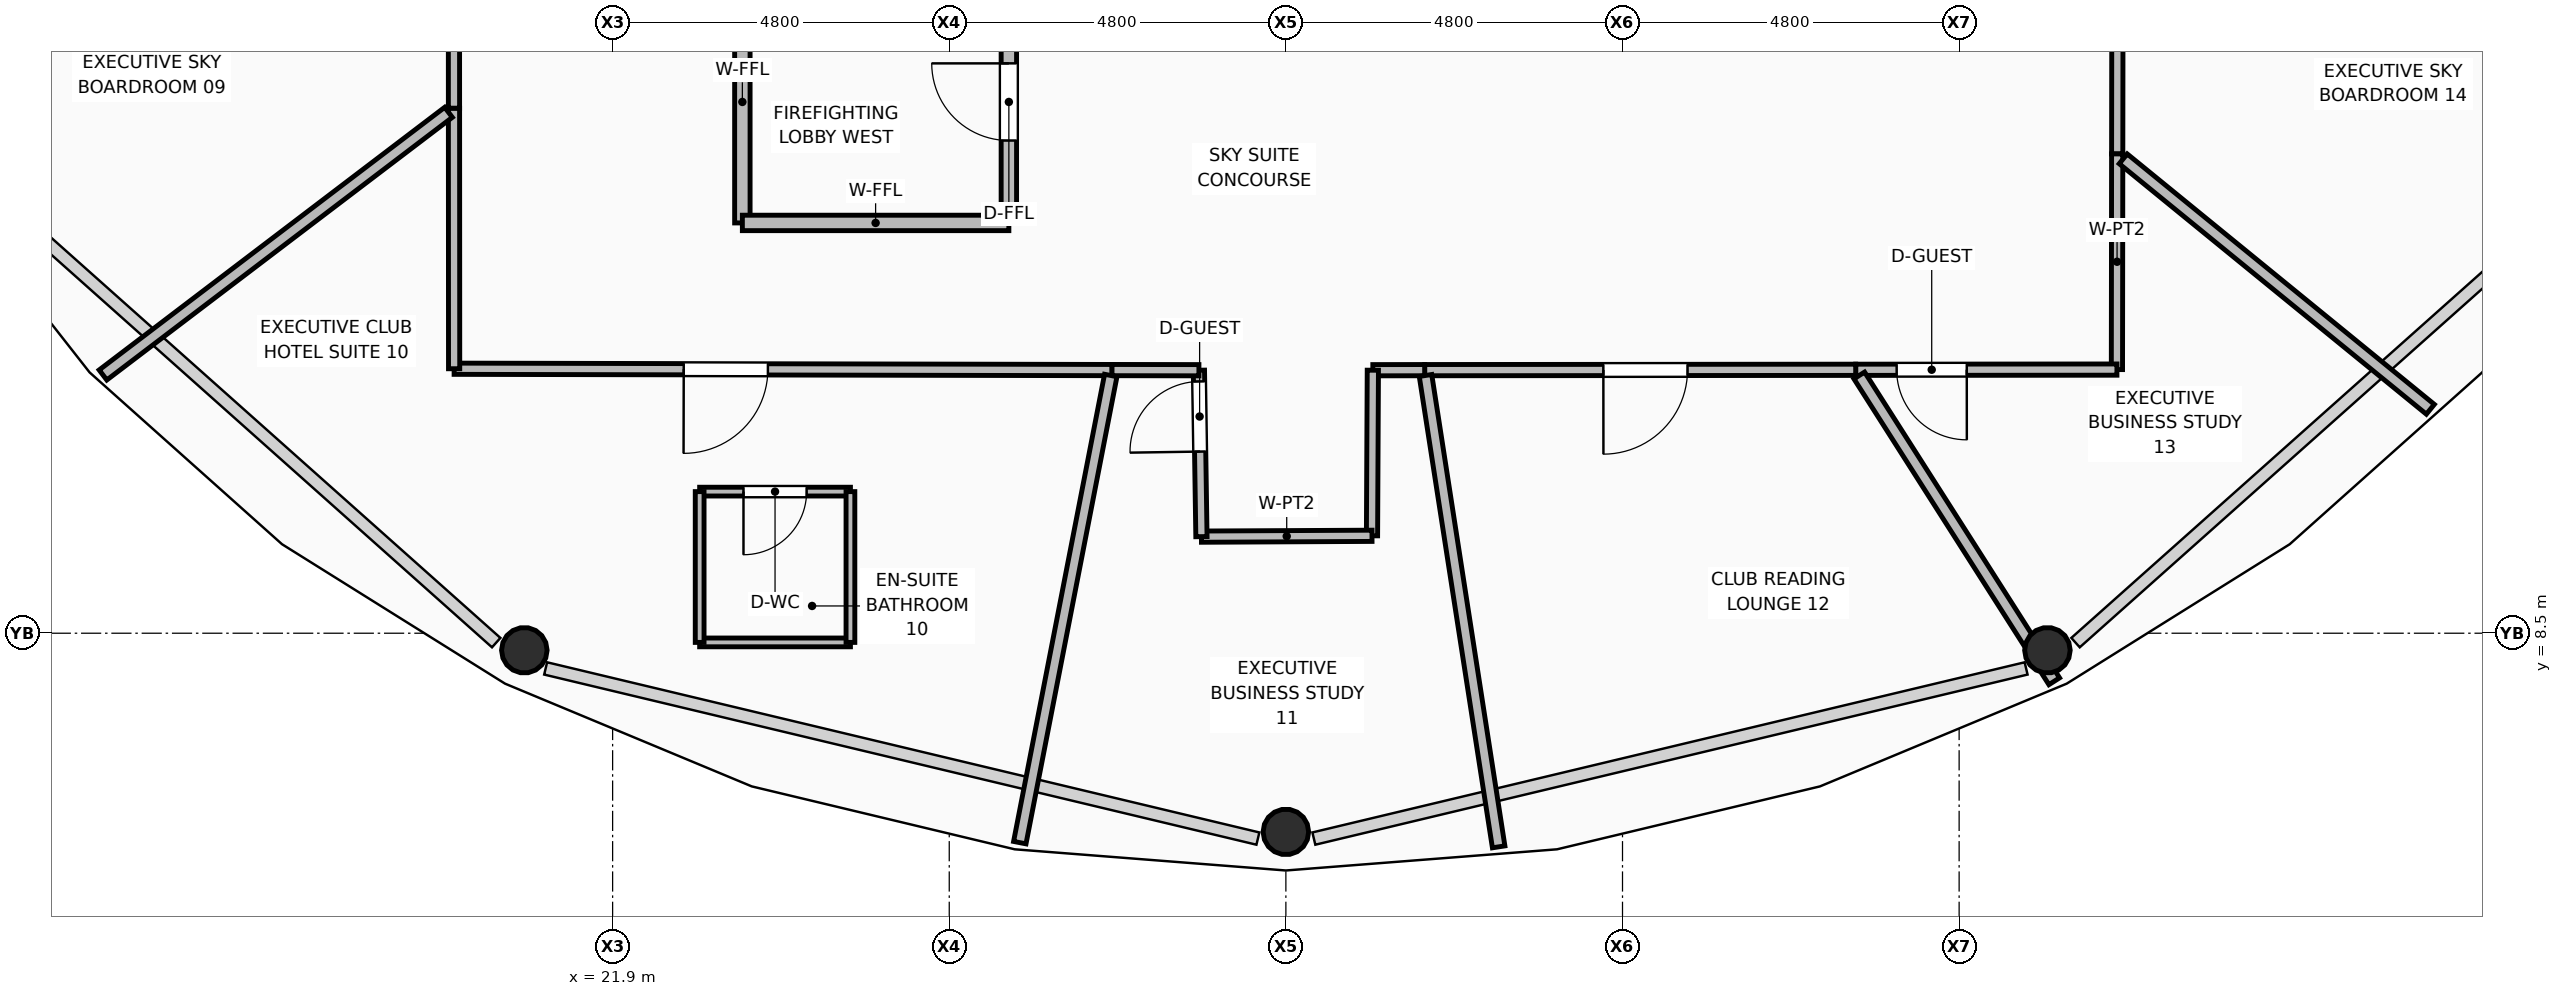
"""IFC4 building model, lengths in metres.
Left out: names, types, materials, properties, quantities, classifications, styles, units other than length and angle.
Written with IfcOpenShell. Run it as: python <this file> out.ifc"""

import sys

from ifc_helpers import new_model, si_unit, direction, frame, frame_2d, origin, origin_2d, place, context, subcontext, project, spatial, rectangle, hollow_circle, extrude, element, fill, save


model = new_model("IFC4")
c1 = context("Model", 3, precision=1e-05, world=origin(), true_north=direction((0.0, 1.0)))
c2 = subcontext(c1, "Body", "Model", "MODEL_VIEW")
j1 = project(units=[si_unit("LENGTHUNIT", "METRE"), si_unit("PLANEANGLEUNIT", "RADIAN")], contexts=[c1])
p1 = place(None, origin())
s1 = spatial("IfcSite", under=j1, at=p1, CompositionType="ELEMENT")
p2 = place(p1, origin())
s2 = spatial("IfcBuilding", under=s1, at=p2, CompositionType="ELEMENT")
p3 = place(p2, frame((0.0, 0.0, 249.9)))
s3 = spatial("IfcBuildingStorey", under=s2, at=p3, CompositionType="ELEMENT", Elevation=249.9)
p4 = place(p3, frame((20.641, 8.257, 0.0), z_axis=(0.052280348299, 0.081024125451, 0.995340070668), x_axis=(-0.840264904476, 0.542176069469, 0.0)))
e1 = element("IfcColumn", 1, at=p4, inside=s3, PredefinedType="COLUMN", context=c2, shape_type="SweptSolid", body=[
    extrude(hollow_circle(Radius=0.325, WallThickness=0.03, at=origin_2d()), origin(), (0.0, 0.0, 1.0), 3.516),
])
p5 = place(p3, frame((31.5, 5.667, 0.0), z_axis=(0.0, 0.093616077373, 0.99560837183), x_axis=(-1.0, 0.0, 0.0)))
e2 = element("IfcColumn", 2, at=p5, inside=s3, PredefinedType="COLUMN", context=c2, shape_type="SweptSolid", body=[
    extrude(hollow_circle(Radius=0.325, WallThickness=0.03, at=origin_2d()), origin(), (0.0, 0.0, 1.0), 3.515),
])
p6 = place(p3, frame((42.359, 8.257, 0.0), z_axis=(-0.052280348299, 0.081024125451, 0.995340070668), x_axis=(-0.840264904476, -0.542176069469, 0.0)))
e3 = element("IfcColumn", 3, at=p6, inside=s3, PredefinedType="COLUMN", context=c2, shape_type="SweptSolid", body=[
    extrude(hollow_circle(Radius=0.325, WallThickness=0.03, at=origin_2d()), origin(), (0.0, 0.0, 1.0), 3.516),
])
p7 = place(p3, frame((23.75, 14.35, 0.0), z_axis=(0.0, 0.0, 1.0), x_axis=(0.0, 1.0, 0.0)))
e4 = element("IfcWall", 4, at=p7, inside=s3, PredefinedType="PARTITIONING", context=c2, shape_type="SweptSolid", body=[
    extrude(rectangle(XDim=3.45, YDim=0.22, at=frame_2d((1.725, 0.0))), origin(), (0.0, 0.0, 1.0), 3.012),
])
p8 = place(p3, frame((23.75, 14.35, 0.0), z_axis=(0.0, 0.0, 1.0), x_axis=(1.0, 0.0, 0.0)))
e5 = element("IfcWall", 5, at=p8, inside=s3, PredefinedType="PARTITIONING", context=c2, shape_type="SweptSolid", body=[
    extrude(rectangle(XDim=3.8, YDim=0.22, at=frame_2d((1.9, 0.0))), origin(), (0.0, 0.0, 1.0), 3.48),
])
p9 = place(p3, frame((27.55, 14.35, 0.0), z_axis=(0.0, 0.0, 1.0), x_axis=(0.0, 1.0, 0.0)))
e6 = element("IfcWall", 6, at=p9, inside=s3, PredefinedType="PARTITIONING", context=c2, shape_type="SweptSolid", body=[
    extrude(rectangle(XDim=3.45, YDim=0.22, at=frame_2d((1.725, 0.0))), origin(), (0.0, 0.0, 1.0), 3.012),
])
p10 = place(p9, frame((1.175, 0.0, 0.0)))
e7 = element("IfcOpeningElement", 7, at=p10, cuts=e6, PredefinedType="OPENING", context=c2, shape_type="SweptSolid", body=[
    extrude(rectangle(XDim=1.1, YDim=2.1, at=frame_2d((0.55, 1.05))), frame((0.0, 0.12, 0.0), z_axis=(0.0, -1.0, 0.0), x_axis=(1.0, 0.0, 0.0)), (0.0, 0.0, 1.0), 0.24),
])
p11 = place(p3, frame((43.362, 21.09, 0.0), z_axis=(0.0, 0.0, 1.0), x_axis=(-0.001399667798, -0.999999020465, 0.0)))
e8 = element("IfcWall", 8, at=p11, inside=s3, PredefinedType="PARTITIONING", context=c2, shape_type="SweptSolid", body=[
    extrude(rectangle(XDim=5.756, YDim=0.16, at=frame_2d((2.878, 0.0))), origin(), (0.0, 0.0, 1.0), 3.012),
])
p12 = place(p11, frame((0.598, 0.0, 0.0)))
e9 = element("IfcOpeningElement", 9, at=p12, cuts=e8, PredefinedType="OPENING", context=c2, shape_type="SweptSolid", body=[
    extrude(rectangle(XDim=1.2, YDim=2.1, at=frame_2d((0.6, 1.05))), frame((0.0, 0.09, 0.0), z_axis=(0.0, -1.0, 0.0), x_axis=(1.0, 0.0, 0.0)), (0.0, 0.0, 1.0), 0.18),
])
p13 = place(p3, frame((43.354, 15.334, 0.0), z_axis=(0.0, 0.0, 1.0), x_axis=(-0.00127034435, -0.999999193112, 0.0)))
e10 = element("IfcWall", 10, at=p13, inside=s3, PredefinedType="PARTITIONING", context=c2, shape_type="SweptSolid", body=[
    extrude(rectangle(XDim=3.075, YDim=0.16, at=frame_2d((1.538, 0.0))), origin(), (0.0, 0.0, 1.0), 3.48),
])
p14 = place(p3, frame((43.35, 12.259, 0.0), z_axis=(0.0, 0.0, 1.0), x_axis=(-0.999999690731, -0.000786472427, 0.0)))
e11 = element("IfcWall", 11, at=p14, inside=s3, PredefinedType="PARTITIONING", context=c2, shape_type="SweptSolid", body=[
    extrude(rectangle(XDim=3.725, YDim=0.16, at=frame_2d((1.863, 0.0))), origin(), (0.0, 0.0, 1.0), 3.012),
])
p15 = place(p14, frame((2.141, 0.0, 0.0)))
e12 = element("IfcOpeningElement", 12, at=p15, cuts=e11, PredefinedType="OPENING", context=c2, shape_type="SweptSolid", body=[
    extrude(rectangle(XDim=1.0, YDim=2.1, at=frame_2d((0.5, 1.05))), frame((0.0, 0.09, 0.0), z_axis=(0.0, -1.0, 0.0), x_axis=(1.0, 0.0, 0.0)), (0.0, 0.0, 1.0), 0.18),
])
p16 = place(p3, frame((39.625, 12.256, 0.0), z_axis=(0.0, 0.0, 1.0), x_axis=(-0.99999965206, -0.000834193719, 0.0)))
e13 = element("IfcWall", 13, at=p16, inside=s3, PredefinedType="PARTITIONING", context=c2, shape_type="SweptSolid", body=[
    extrude(rectangle(XDim=6.146, YDim=0.16, at=frame_2d((3.073, 0.0))), origin(), (0.0, 0.0, 1.0), 3.48),
])
p17 = place(p16, frame((2.398, 0.0, 0.0)))
e14 = element("IfcOpeningElement", 14, at=p17, cuts=e13, PredefinedType="OPENING", context=c2, shape_type="SweptSolid", body=[
    extrude(rectangle(XDim=1.2, YDim=2.1, at=frame_2d((0.6, 1.05))), frame((0.0, 0.09, 0.0), z_axis=(0.0, -1.0, 0.0), x_axis=(1.0, 0.0, 0.0)), (0.0, 0.0, 1.0), 0.18),
])
p18 = place(p3, frame((33.479, 12.251, 0.0), z_axis=(0.0, 0.0, 1.0), x_axis=(-0.999999126899, -0.001321439216, 0.0)))
e15 = element("IfcWall", 15, at=p18, inside=s3, PredefinedType="PARTITIONING", context=c2, shape_type="SweptSolid", body=[
    extrude(rectangle(XDim=0.739, YDim=0.16, at=frame_2d((0.37, 0.0))), origin(), (0.0, 0.0, 1.0), 3.48),
])
p19 = place(p3, frame((32.74, 12.25, 0.0), z_axis=(0.0, 0.0, 1.0), x_axis=(-0.005066629207, -0.999987164552, 0.0)))
e16 = element("IfcWall", 16, at=p19, inside=s3, PredefinedType="PARTITIONING", context=c2, shape_type="SweptSolid", body=[
    extrude(rectangle(XDim=2.361, YDim=0.16, at=frame_2d((1.181, 0.0))), origin(), (0.0, 0.0, 1.0), 3.48),
])
p20 = place(p3, frame((32.728, 9.889, 0.0), z_axis=(0.0, 0.0, 1.0), x_axis=(-0.999987903459, -0.004918631527, 0.0)))
e17 = element("IfcWall", 17, at=p20, inside=s3, PredefinedType="PARTITIONING", context=c2, shape_type="SweptSolid", body=[
    extrude(rectangle(XDim=2.432, YDim=0.16, at=frame_2d((1.216, 0.0))), origin(), (0.0, 0.0, 1.0), 3.012),
])
p21 = place(p3, frame((30.296, 9.877, 0.0), z_axis=(0.0, 0.0, 1.0), x_axis=(-0.015121727576, 0.999885660141, 0.0)))
e18 = element("IfcWall", 18, at=p21, inside=s3, PredefinedType="PARTITIONING", context=c2, shape_type="SweptSolid", body=[
    extrude(rectangle(XDim=2.373, YDim=0.16, at=frame_2d((1.187, 0.0))), origin(), (0.0, 0.0, 1.0), 3.48),
])
p22 = place(p21, frame((1.213, 0.0, 0.0)))
e19 = element("IfcOpeningElement", 19, at=p22, cuts=e18, PredefinedType="OPENING", context=c2, shape_type="SweptSolid", body=[
    extrude(rectangle(XDim=1.0, YDim=2.1, at=frame_2d((0.5, 1.05))), frame((0.0, 0.09, 0.0), z_axis=(0.0, -1.0, 0.0), x_axis=(1.0, 0.0, 0.0)), (0.0, 0.0, 1.0), 0.18),
])
p23 = place(p3, frame((30.26, 12.25, 0.0), z_axis=(0.0, 0.0, 1.0), x_axis=(-0.99999876341, 0.001572634187, 0.0)))
e20 = element("IfcWall", 20, at=p23, inside=s3, PredefinedType="PARTITIONING", context=c2, shape_type="SweptSolid", body=[
    extrude(rectangle(XDim=1.242, YDim=0.16, at=frame_2d((0.621, 0.0))), origin(), (0.0, 0.0, 1.0), 3.48),
])
p24 = place(p3, frame((29.018, 12.252, 0.0), z_axis=(0.0, 0.0, 1.0), x_axis=(-0.999997938414, 0.002030558384, 0.0)))
e21 = element("IfcWall", 21, at=p24, inside=s3, PredefinedType="PARTITIONING", context=c2, shape_type="SweptSolid", body=[
    extrude(rectangle(XDim=9.378, YDim=0.16, at=frame_2d((4.689, 0.0))), origin(), (0.0, 0.0, 1.0), 3.012),
])
p25 = place(p24, frame((4.904, 0.0, 0.0)))
e22 = element("IfcOpeningElement", 22, at=p25, cuts=e21, PredefinedType="OPENING", context=c2, shape_type="SweptSolid", body=[
    extrude(rectangle(XDim=1.2, YDim=2.1, at=frame_2d((0.6, 1.05))), frame((0.0, 0.09, 0.0), z_axis=(0.0, -1.0, 0.0), x_axis=(1.0, 0.0, 0.0)), (0.0, 0.0, 1.0), 0.18),
])
p26 = place(p3, frame((19.64, 12.271, 0.0), z_axis=(0.0, 0.0, 1.0), x_axis=(-0.000525727732, 0.999999861805, 0.0)))
e23 = element("IfcWall", 23, at=p26, inside=s3, PredefinedType="PARTITIONING", context=c2, shape_type="SweptSolid", body=[
    extrude(rectangle(XDim=3.715, YDim=0.16, at=frame_2d((1.857, 0.0))), origin(), (0.0, 0.0, 1.0), 3.48),
])
p27 = place(p3, frame((19.638, 15.986, 0.0), z_axis=(0.0, 0.0, 1.0), x_axis=(-0.000382665236, 0.999999926784, 0.0)))
e24 = element("IfcWall", 24, at=p27, inside=s3, PredefinedType="PARTITIONING", context=c2, shape_type="SweptSolid", body=[
    extrude(rectangle(XDim=5.104, YDim=0.16, at=frame_2d((2.552, 0.0))), origin(), (0.0, 0.0, 1.0), 3.012),
])
p28 = place(p27, frame((3.296, 0.0, 0.0)))
e25 = element("IfcOpeningElement", 25, at=p28, cuts=e24, PredefinedType="OPENING", context=c2, shape_type="SweptSolid", body=[
    extrude(rectangle(XDim=1.2, YDim=2.1, at=frame_2d((0.6, 1.05))), frame((0.0, 0.09, 0.0), z_axis=(0.0, -1.0, 0.0), x_axis=(1.0, 0.0, 0.0)), (0.0, 0.0, 1.0), 0.18),
])
p29 = place(p3, frame((19.56, 15.927, 0.0), z_axis=(0.0, 0.0, 1.0), x_axis=(-0.796115821465, -0.605144279336, 0.0)))
e26 = element("IfcWall", 26, at=p29, inside=s3, PredefinedType="PARTITIONING", context=c2, shape_type="SweptSolid", body=[
    extrude(rectangle(XDim=6.189, YDim=0.18, at=frame_2d((3.094, 0.0))), origin(), (0.0, 0.0, 1.0), 2.855),
])
p30 = place(p3, frame((29.003, 12.175, 0.0), z_axis=(0.0, 0.0, 1.0), x_axis=(-0.191104607793, -0.981569676019, 0.0)))
e27 = element("IfcWall", 27, at=p30, inside=s3, PredefinedType="PARTITIONING", context=c2, shape_type="SweptSolid", body=[
    extrude(rectangle(XDim=6.786, YDim=0.18, at=frame_2d((3.393, 0.0))), origin(), (0.0, 0.0, 1.0), 2.855),
])
p31 = place(p3, frame((33.491, 12.175, 0.0), z_axis=(0.0, 0.0, 1.0), x_axis=(0.15334639492, -0.988172496665, 0.0)))
e28 = element("IfcWall", 28, at=p31, inside=s3, PredefinedType="PARTITIONING", context=c2, shape_type="SweptSolid", body=[
    extrude(rectangle(XDim=6.801, YDim=0.18, at=frame_2d((3.401, 0.0))), origin(), (0.0, 0.0, 1.0), 2.855),
])
p32 = place(p3, frame((39.676, 12.175, 0.0), z_axis=(0.0, 0.0, 1.0), x_axis=(0.53762070128, -0.843186801103, 0.0)))
e29 = element("IfcWall", 29, at=p32, inside=s3, PredefinedType="PARTITIONING", context=c2, shape_type="SweptSolid", body=[
    extrude(rectangle(XDim=5.171, YDim=0.18, at=frame_2d((2.585, 0.0))), origin(), (0.0, 0.0, 1.0), 2.855),
])
p33 = place(p3, frame((43.44, 15.264, 0.0), z_axis=(0.0, 0.0, 1.0), x_axis=(0.77500924649, -0.631949893469, 0.0)))
e30 = element("IfcWall", 30, at=p33, inside=s3, PredefinedType="PARTITIONING", context=c2, shape_type="SweptSolid", body=[
    extrude(rectangle(XDim=5.65, YDim=0.18, at=frame_2d((2.825, 0.0))), origin(), (0.0, 0.0, 1.0), 2.855),
])
p34 = place(p3, frame((23.141, 8.369, 0.0), z_axis=(0.0, 0.0, 1.0), x_axis=(1.0, 0.0, 0.0)))
e31 = element("IfcWall", 31, at=p34, inside=s3, PredefinedType="PARTITIONING", context=c2, shape_type="SweptSolid", body=[
    extrude(rectangle(XDim=2.15, YDim=0.125, at=frame_2d((1.075, 0.0))), origin(), (0.0, 0.0, 1.0), 2.855),
])
p35 = place(p3, frame((23.141, 10.519, 0.0), z_axis=(0.0, 0.0, 1.0), x_axis=(1.0, 0.0, 0.0)))
e32 = element("IfcWall", 32, at=p35, inside=s3, PredefinedType="PARTITIONING", context=c2, shape_type="SweptSolid", body=[
    extrude(rectangle(XDim=2.15, YDim=0.125, at=frame_2d((1.075, 0.0))), origin(), (0.0, 0.0, 1.0), 3.48),
])
p36 = place(p35, frame((0.625, 0.0, 0.0)))
e33 = element("IfcOpeningElement", 33, at=p36, cuts=e32, PredefinedType="OPENING", context=c2, shape_type="SweptSolid", body=[
    extrude(rectangle(XDim=0.9, YDim=2.1, at=frame_2d((0.45, 1.05))), frame((0.0, 0.073, 0.0), z_axis=(0.0, -1.0, 0.0), x_axis=(1.0, 0.0, 0.0)), (0.0, 0.0, 1.0), 0.145),
])
for number, where, z_axis, x_axis in (
    (34, (23.141, 8.369, 0.0), (0.0, 0.0, 1.0), (0.0, 1.0, 0.0)),
    (35, (25.291, 8.369, 0.0), (0.0, 0.0, 1.0), (0.0, 1.0, 0.0)),
):
    element("IfcWall", number, at=place(p3, frame(where, z_axis=z_axis, x_axis=x_axis)), inside=s3, PredefinedType="PARTITIONING", context=c2, shape_type="SweptSolid", body=[
        extrude(rectangle(XDim=2.15, YDim=0.125, at=frame_2d((1.075, 0.0))), origin(), (0.0, 0.0, 1.0), 3.48),
    ])
p37 = place(p10, origin())
e36 = element("IfcDoor", 36, at=p37, inside=s3, OperationType="SINGLE_SWING_RIGHT", PredefinedType="DOOR", context=c2, shape_type="SweptSolid", body=[
    extrude(rectangle(XDim=1.1, YDim=2.1, at=frame_2d((0.55, 1.05))), frame((0.0, 0.025, 0.0), z_axis=(0.0, -1.0, 0.0), x_axis=(1.0, 0.0, 0.0)), (0.0, 0.0, 1.0), 0.05),
])
fill(e7, e36)
p38 = place(p36, frame((0.9, 0.0, 0.0), z_axis=(0.0, 0.0, 1.0), x_axis=(-1.0, 0.0, 0.0)))
e37 = element("IfcDoor", 37, at=p38, inside=s3, OperationType="SINGLE_SWING_RIGHT", PredefinedType="DOOR", context=c2, shape_type="SweptSolid", body=[
    extrude(rectangle(XDim=0.9, YDim=2.1, at=frame_2d((0.45, 1.05))), frame((0.0, 0.025, 0.0), z_axis=(0.0, -1.0, 0.0), x_axis=(1.0, 0.0, 0.0)), (0.0, 0.0, 1.0), 0.05),
])
fill(e33, e37)
p39 = place(p25, origin())
e38 = element("IfcDoor", 38, at=p39, inside=s3, OperationType="SINGLE_SWING_RIGHT", PredefinedType="DOOR", context=c2, shape_type="SweptSolid", body=[
    extrude(rectangle(XDim=1.2, YDim=2.1, at=frame_2d((0.6, 1.05))), frame((0.0, 0.025, 0.0), z_axis=(0.0, -1.0, 0.0), x_axis=(1.0, 0.0, 0.0)), (0.0, 0.0, 1.0), 0.05),
])
fill(e22, e38)
p40 = place(p22, origin())
e39 = element("IfcDoor", 39, at=p40, inside=s3, OperationType="SINGLE_SWING_LEFT", PredefinedType="DOOR", context=c2, shape_type="SweptSolid", body=[
    extrude(rectangle(XDim=1.0, YDim=2.1, at=frame_2d((0.5, 1.05))), frame((0.0, 0.025, 0.0), z_axis=(0.0, -1.0, 0.0), x_axis=(1.0, 0.0, 0.0)), (0.0, 0.0, 1.0), 0.05),
])
fill(e19, e39)
p41 = place(p17, origin())
e40 = element("IfcDoor", 40, at=p41, inside=s3, OperationType="SINGLE_SWING_RIGHT", PredefinedType="DOOR", context=c2, shape_type="SweptSolid", body=[
    extrude(rectangle(XDim=1.2, YDim=2.1, at=frame_2d((0.6, 1.05))), frame((0.0, 0.025, 0.0), z_axis=(0.0, -1.0, 0.0), x_axis=(1.0, 0.0, 0.0)), (0.0, 0.0, 1.0), 0.05),
])
fill(e14, e40)
p42 = place(p15, origin())
e41 = element("IfcDoor", 41, at=p42, inside=s3, OperationType="SINGLE_SWING_LEFT", PredefinedType="DOOR", context=c2, shape_type="SweptSolid", body=[
    extrude(rectangle(XDim=1.0, YDim=2.1, at=frame_2d((0.5, 1.05))), frame((0.0, 0.025, 0.0), z_axis=(0.0, -1.0, 0.0), x_axis=(1.0, 0.0, 0.0)), (0.0, 0.0, 1.0), 0.05),
])
fill(e12, e41)
save(model, sys.argv[1])
